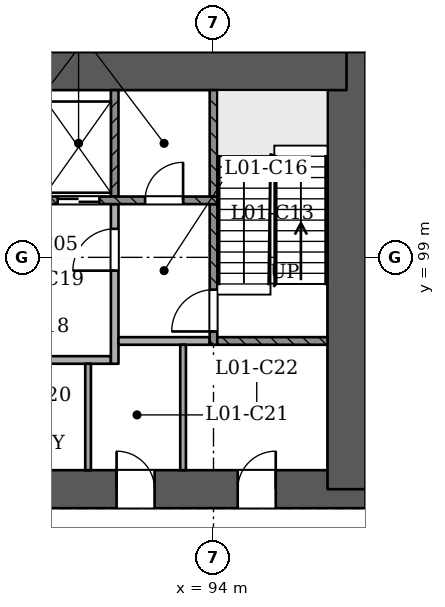
"""IFC4 building model, lengths in metres.
Left out: names, types, materials, properties, quantities, classifications, styles, units other than length and angle.
Written with IfcOpenShell. Run it as: python <this file> out.ifc"""

import sys

from ifc_helpers import new_model, si_unit, direction, frame, frame_2d, origin, place, context, subcontext, project, spatial, rectangle, extrude, element, fill, save


model = new_model("IFC4")
c1 = context("Model", 3, precision=1e-05, world=origin(), true_north=direction((0.0, 1.0)))
c2 = subcontext(c1, "Body", "Model", "MODEL_VIEW")
j1 = project(units=[si_unit("LENGTHUNIT", "METRE"), si_unit("PLANEANGLEUNIT", "RADIAN")], contexts=[c1])
p1 = place(None, origin())
s1 = spatial("IfcSite", under=j1, at=p1, CompositionType="ELEMENT")
p2 = place(p1, origin())
s2 = spatial("IfcBuilding", under=s1, at=p2, CompositionType="ELEMENT")
p3 = place(p2, frame((0.0, 0.0, 9.0)))
s3 = spatial("IfcBuildingStorey", under=s2, at=p3, CompositionType="ELEMENT", Elevation=9.0)
p4 = place(p3, frame((72.5, 92.9, 0.0), z_axis=(0.0, 0.0, 1.0), x_axis=(1.0, 0.0, 0.0)))
e1 = element("IfcWall", 1, at=p4, inside=s3, PredefinedType="SHEAR", context=c2, shape_type="SweptSolid", body=[
    extrude(rectangle(XDim=25.5, YDim=1.0, at=frame_2d((12.75, 0.0))), origin(), (0.0, 0.0, 1.0), 4.5),
])
p5 = place(p4, frame((1.3, 0.0, 0.0)))
e2 = element("IfcOpeningElement", 2, at=p5, cuts=e1, PredefinedType="OPENING", context=c2, shape_type="SweptSolid", body=[
    extrude(rectangle(XDim=1.2, YDim=2.1, at=frame_2d((0.6, 1.05))), frame((0.0, 0.51, 0.0), z_axis=(0.0, -1.0, 0.0), x_axis=(1.0, 0.0, 0.0)), (0.0, 0.0, 1.0), 1.021),
])
p6 = place(p4, frame((3.5, 0.0, 0.0)))
e3 = element("IfcOpeningElement", 3, at=p6, cuts=e1, PredefinedType="OPENING", context=c2, shape_type="SweptSolid", body=[
    extrude(rectangle(XDim=1.2, YDim=2.1, at=frame_2d((0.6, 1.05))), frame((0.0, 0.51, 0.0), z_axis=(0.0, -1.0, 0.0), x_axis=(1.0, 0.0, 0.0)), (0.0, 0.0, 1.0), 1.021),
])
p7 = place(p4, frame((13.5, 0.0, 0.0)))
e4 = element("IfcOpeningElement", 4, at=p7, cuts=e1, PredefinedType="OPENING", context=c2, shape_type="SweptSolid", body=[
    extrude(rectangle(XDim=1.2, YDim=2.1, at=frame_2d((0.6, 1.05))), frame((0.0, 0.51, 0.0), z_axis=(0.0, -1.0, 0.0), x_axis=(1.0, 0.0, 0.0)), (0.0, 0.0, 1.0), 1.021),
])
p8 = place(p4, frame((16.163, 0.0, 0.0)))
e5 = element("IfcOpeningElement", 5, at=p8, cuts=e1, PredefinedType="OPENING", context=c2, shape_type="SweptSolid", body=[
    extrude(rectangle(XDim=1.0, YDim=2.1, at=frame_2d((0.5, 1.05))), frame((0.0, 0.51, 0.0), z_axis=(0.0, -1.0, 0.0), x_axis=(1.0, 0.0, 0.0)), (0.0, 0.0, 1.0), 1.021),
])
p9 = place(p4, frame((18.95, 0.0, 0.0)))
e6 = element("IfcOpeningElement", 6, at=p9, cuts=e1, PredefinedType="OPENING", context=c2, shape_type="SweptSolid", body=[
    extrude(rectangle(XDim=1.0, YDim=2.1, at=frame_2d((0.5, 1.05))), frame((0.0, 0.51, 0.0), z_axis=(0.0, -1.0, 0.0), x_axis=(1.0, 0.0, 0.0)), (0.0, 0.0, 1.0), 1.021),
])
p10 = place(p4, frame((22.137, 0.0, 0.0)))
e7 = element("IfcOpeningElement", 7, at=p10, cuts=e1, PredefinedType="OPENING", context=c2, shape_type="SweptSolid", body=[
    extrude(rectangle(XDim=1.0, YDim=2.1, at=frame_2d((0.5, 1.05))), frame((0.0, 0.51, 0.0), z_axis=(0.0, -1.0, 0.0), x_axis=(1.0, 0.0, 0.0)), (0.0, 0.0, 1.0), 1.021),
])
p11 = place(p3, frame((97.5, 92.9, 0.0), z_axis=(0.0, 0.0, 1.0), x_axis=(0.0, 1.0, 0.0)))
e8 = element("IfcWall", 8, at=p11, inside=s3, PredefinedType="SHEAR", context=c2, shape_type="SweptSolid", body=[
    extrude(rectangle(XDim=11.5, YDim=1.0, at=frame_2d((5.75, 0.0))), origin(), (0.0, 0.0, 1.0), 4.5),
])
p12 = place(p3, frame((97.5, 103.9, 0.0), z_axis=(0.0, 0.0, 1.0), x_axis=(-1.0, 0.0, 0.0)))
e9 = element("IfcWall", 9, at=p12, inside=s3, PredefinedType="SHEAR", context=c2, shape_type="SweptSolid", body=[
    extrude(rectangle(XDim=25.5, YDim=1.0, at=frame_2d((12.75, 0.0))), origin(), (0.0, 0.0, 1.0), 4.5),
])
p13 = place(p3, frame((86.747, 47.526, 0.0), z_axis=(0.0, 0.0, 1.0), x_axis=(0.500000085768, 0.866025354266, 0.0)))
e10 = element("IfcWall", 10, at=p13, inside=s3, PredefinedType="PARTITIONING", context=c2, shape_type="SweptSolid", body=[
    extrude(rectangle(XDim=55.365, YDim=0.15, at=frame_2d((27.682, 0.0))), origin(), (0.0, 0.0, 1.0), 4.05),
])
p14 = place(p13, frame((0.97, 0.0, 0.0)))
e11 = element("IfcOpeningElement", 11, at=p14, cuts=e10, PredefinedType="OPENING", context=c2, shape_type="SweptSolid", body=[
    extrude(rectangle(XDim=1.2, YDim=2.1, at=frame_2d((0.6, 1.05))), frame((0.0, 0.085, 0.0), z_axis=(0.0, -1.0, 0.0), x_axis=(1.0, 0.0, 0.0)), (0.0, 0.0, 1.0), 0.171),
])
p15 = place(p13, frame((9.082, 0.0, 0.0)))
e12 = element("IfcOpeningElement", 12, at=p15, cuts=e10, PredefinedType="OPENING", context=c2, shape_type="SweptSolid", body=[
    extrude(rectangle(XDim=1.2, YDim=2.1, at=frame_2d((0.6, 1.05))), frame((0.0, 0.085, 0.0), z_axis=(0.0, -1.0, 0.0), x_axis=(1.0, 0.0, 0.0)), (0.0, 0.0, 1.0), 0.171),
])
p16 = place(p13, frame((18.082, 0.0, 0.0)))
e13 = element("IfcOpeningElement", 13, at=p16, cuts=e10, PredefinedType="OPENING", context=c2, shape_type="SweptSolid", body=[
    extrude(rectangle(XDim=1.2, YDim=2.1, at=frame_2d((0.6, 1.05))), frame((0.0, 0.085, 0.0), z_axis=(0.0, -1.0, 0.0), x_axis=(1.0, 0.0, 0.0)), (0.0, 0.0, 1.0), 0.171),
])
p17 = place(p13, frame((23.613, 0.0, 0.0)))
e14 = element("IfcOpeningElement", 14, at=p17, cuts=e10, PredefinedType="OPENING", context=c2, shape_type="SweptSolid", body=[
    extrude(rectangle(XDim=1.0, YDim=2.1, at=frame_2d((0.5, 1.05))), frame((0.0, 0.085, 0.0), z_axis=(0.0, -1.0, 0.0), x_axis=(1.0, 0.0, 0.0)), (0.0, 0.0, 1.0), 0.171),
])
p18 = place(p13, frame((26.363, 0.0, 0.0)))
e15 = element("IfcOpeningElement", 15, at=p18, cuts=e10, PredefinedType="OPENING", context=c2, shape_type="SweptSolid", body=[
    extrude(rectangle(XDim=1.0, YDim=2.1, at=frame_2d((0.5, 1.05))), frame((0.0, 0.085, 0.0), z_axis=(0.0, -1.0, 0.0), x_axis=(1.0, 0.0, 0.0)), (0.0, 0.0, 1.0), 0.171),
])
p19 = place(p13, frame((33.032, 0.0, 0.0)))
e16 = element("IfcOpeningElement", 16, at=p19, cuts=e10, PredefinedType="OPENING", context=c2, shape_type="SweptSolid", body=[
    extrude(rectangle(XDim=1.2, YDim=2.1, at=frame_2d((0.6, 1.05))), frame((0.0, 0.085, 0.0), z_axis=(0.0, -1.0, 0.0), x_axis=(1.0, 0.0, 0.0)), (0.0, 0.0, 1.0), 0.171),
])
p20 = place(p13, frame((47.337, 0.0, 0.0)))
e17 = element("IfcOpeningElement", 17, at=p20, cuts=e10, PredefinedType="OPENING", context=c2, shape_type="SweptSolid", body=[
    extrude(rectangle(XDim=1.2, YDim=2.1, at=frame_2d((0.6, 1.05))), frame((0.0, 0.085, 0.0), z_axis=(0.0, -1.0, 0.0), x_axis=(1.0, 0.0, 0.0)), (0.0, 0.0, 1.0), 0.171),
])
p21 = place(p3, frame((121.762, 95.574, 0.0), z_axis=(0.0, 0.0, 1.0), x_axis=(-0.499997306052, -0.866026959131, 0.0)))
e18 = element("IfcWall", 18, at=p21, inside=s3, PredefinedType="SOLIDWALL", context=c2, shape_type="SweptSolid", body=[
    extrude(rectangle(XDim=62.87, YDim=0.4, at=frame_2d((31.435, 0.0))), origin(), (0.0, 0.0, 1.0), 4.05),
])
p22 = place(p21, frame((59.452, 0.0, 0.9)))
e19 = element("IfcOpeningElement", 19, at=p22, cuts=e18, PredefinedType="OPENING", context=c2, shape_type="SweptSolid", body=[
    extrude(rectangle(XDim=2.4, YDim=1.5, at=frame_2d((1.2, 0.75))), frame((0.0, 0.21, 0.0), z_axis=(0.0, -1.0, 0.0), x_axis=(1.0, 0.0, 0.0)), (0.0, 0.0, 1.0), 0.421),
])
p23 = place(p21, frame((54.986, 0.0, 0.9)))
e20 = element("IfcOpeningElement", 20, at=p23, cuts=e18, PredefinedType="OPENING", context=c2, shape_type="SweptSolid", body=[
    extrude(rectangle(XDim=2.4, YDim=1.5, at=frame_2d((1.2, 0.75))), frame((0.0, 0.21, 0.0), z_axis=(0.0, -1.0, 0.0), x_axis=(1.0, 0.0, 0.0)), (0.0, 0.0, 1.0), 0.421),
])
p24 = place(p21, frame((50.486, 0.0, 0.9)))
e21 = element("IfcOpeningElement", 21, at=p24, cuts=e18, PredefinedType="OPENING", context=c2, shape_type="SweptSolid", body=[
    extrude(rectangle(XDim=2.4, YDim=1.5, at=frame_2d((1.2, 0.75))), frame((0.0, 0.21, 0.0), z_axis=(0.0, -1.0, 0.0), x_axis=(1.0, 0.0, 0.0)), (0.0, 0.0, 1.0), 0.421),
])
p25 = place(p21, frame((45.986, 0.0, 0.9)))
e22 = element("IfcOpeningElement", 22, at=p25, cuts=e18, PredefinedType="OPENING", context=c2, shape_type="SweptSolid", body=[
    extrude(rectangle(XDim=2.4, YDim=1.5, at=frame_2d((1.2, 0.75))), frame((0.0, 0.21, 0.0), z_axis=(0.0, -1.0, 0.0), x_axis=(1.0, 0.0, 0.0)), (0.0, 0.0, 1.0), 0.421),
])
p26 = place(p21, frame((41.486, 0.0, 0.9)))
e23 = element("IfcOpeningElement", 23, at=p26, cuts=e18, PredefinedType="OPENING", context=c2, shape_type="SweptSolid", body=[
    extrude(rectangle(XDim=2.4, YDim=1.5, at=frame_2d((1.2, 0.75))), frame((0.0, 0.21, 0.0), z_axis=(0.0, -1.0, 0.0), x_axis=(1.0, 0.0, 0.0)), (0.0, 0.0, 1.0), 0.421),
])
p27 = place(p21, frame((36.986, 0.0, 0.9)))
e24 = element("IfcOpeningElement", 24, at=p27, cuts=e18, PredefinedType="OPENING", context=c2, shape_type="SweptSolid", body=[
    extrude(rectangle(XDim=2.4, YDim=1.5, at=frame_2d((1.2, 0.75))), frame((0.0, 0.21, 0.0), z_axis=(0.0, -1.0, 0.0), x_axis=(1.0, 0.0, 0.0)), (0.0, 0.0, 1.0), 0.421),
])
p28 = place(p21, frame((23.486, 0.0, 0.9)))
e25 = element("IfcOpeningElement", 25, at=p28, cuts=e18, PredefinedType="OPENING", context=c2, shape_type="SweptSolid", body=[
    extrude(rectangle(XDim=2.4, YDim=1.5, at=frame_2d((1.2, 0.75))), frame((0.0, 0.21, 0.0), z_axis=(0.0, -1.0, 0.0), x_axis=(1.0, 0.0, 0.0)), (0.0, 0.0, 1.0), 0.421),
])
p29 = place(p21, frame((18.986, 0.0, 0.9)))
e26 = element("IfcOpeningElement", 26, at=p29, cuts=e18, PredefinedType="OPENING", context=c2, shape_type="SweptSolid", body=[
    extrude(rectangle(XDim=2.4, YDim=1.5, at=frame_2d((1.2, 0.75))), frame((0.0, 0.21, 0.0), z_axis=(0.0, -1.0, 0.0), x_axis=(1.0, 0.0, 0.0)), (0.0, 0.0, 1.0), 0.421),
])
p30 = place(p21, frame((14.486, 0.0, 0.9)))
e27 = element("IfcOpeningElement", 27, at=p30, cuts=e18, PredefinedType="OPENING", context=c2, shape_type="SweptSolid", body=[
    extrude(rectangle(XDim=2.4, YDim=1.5, at=frame_2d((1.2, 0.75))), frame((0.0, 0.21, 0.0), z_axis=(0.0, -1.0, 0.0), x_axis=(1.0, 0.0, 0.0)), (0.0, 0.0, 1.0), 0.421),
])
p31 = place(p21, frame((5.486, 0.0, 0.9)))
e28 = element("IfcOpeningElement", 28, at=p31, cuts=e18, PredefinedType="OPENING", context=c2, shape_type="SweptSolid", body=[
    extrude(rectangle(XDim=2.4, YDim=1.5, at=frame_2d((1.2, 0.75))), frame((0.0, 0.21, 0.0), z_axis=(0.0, -1.0, 0.0), x_axis=(1.0, 0.0, 0.0)), (0.0, 0.0, 1.0), 0.421),
])
p32 = place(p21, frame((1.018, 0.0, 0.9)))
e29 = element("IfcOpeningElement", 29, at=p32, cuts=e18, PredefinedType="OPENING", context=c2, shape_type="SweptSolid", body=[
    extrude(rectangle(XDim=2.4, YDim=1.5, at=frame_2d((1.2, 0.75))), frame((0.0, 0.21, 0.0), z_axis=(0.0, -1.0, 0.0), x_axis=(1.0, 0.0, 0.0)), (0.0, 0.0, 1.0), 0.421),
])
p33 = place(p3, frame((90.7, 93.4, 0.0), z_axis=(0.0, 0.0, 1.0), x_axis=(0.0, 1.0, 0.0)))
e30 = element("IfcWall", 30, at=p33, inside=s3, PredefinedType="PARTITIONING", context=c2, shape_type="SweptSolid", body=[
    extrude(rectangle(XDim=2.8, YDim=0.15, at=frame_2d((1.4, 0.0))), origin(), (0.0, 0.0, 1.0), 4.05),
])
p34 = place(p3, frame((93.2, 93.4, 0.0), z_axis=(0.0, 0.0, 1.0), x_axis=(0.0, 1.0, 0.0)))
e31 = element("IfcWall", 31, at=p34, inside=s3, PredefinedType="PARTITIONING", context=c2, shape_type="SweptSolid", body=[
    extrude(rectangle(XDim=3.3, YDim=0.15, at=frame_2d((1.65, 0.0))), origin(), (0.0, 0.0, 1.0), 4.05),
])
p35 = place(p3, frame((87.7, 96.3, 0.0), z_axis=(0.0, 0.0, 1.0), x_axis=(1.0, 0.0, 0.0)))
e32 = element("IfcWall", 32, at=p35, inside=s3, PredefinedType="PARTITIONING", context=c2, shape_type="SweptSolid", body=[
    extrude(rectangle(XDim=3.6, YDim=0.2, at=frame_2d((1.8, 0.0))), origin(), (0.0, 0.0, 1.0), 4.05),
])
p36 = place(p3, frame((91.4, 96.2, 0.0), z_axis=(0.0, 0.0, 1.0), x_axis=(0.0, 1.0, 0.0)))
e33 = element("IfcWall", 33, at=p36, inside=s3, PredefinedType="PARTITIONING", context=c2, shape_type="SweptSolid", body=[
    extrude(rectangle(XDim=4.2, YDim=0.2, at=frame_2d((2.1, 0.0))), origin(), (0.0, 0.0, 1.0), 4.05),
])
p37 = place(p36, frame((2.45, 0.0, 0.0)))
e34 = element("IfcOpeningElement", 34, at=p37, cuts=e33, PredefinedType="OPENING", context=c2, shape_type="SweptSolid", body=[
    extrude(rectangle(XDim=1.1, YDim=2.1, at=frame_2d((0.55, 1.05))), frame((0.0, 0.11, 0.0), z_axis=(0.0, -1.0, 0.0), x_axis=(1.0, 0.0, 0.0)), (0.0, 0.0, 1.0), 0.221),
])
p38 = place(p3, frame((91.5, 96.8, 0.0), z_axis=(0.0, 0.0, 1.0), x_axis=(1.0, 0.0, 0.0)))
e35 = element("IfcWall", 35, at=p38, inside=s3, PredefinedType="PARTITIONING", context=c2, shape_type="SweptSolid", body=[
    extrude(rectangle(XDim=2.4, YDim=0.2, at=frame_2d((1.2, 0.0))), origin(), (0.0, 0.0, 1.0), 4.05),
])
p39 = place(p3, frame((94.0, 96.7, 0.0), z_axis=(0.0, 0.0, 1.0), x_axis=(0.0, 1.0, 0.0)))
e36 = element("IfcWall", 36, at=p39, inside=s3, PredefinedType="SOLIDWALL", context=c2, shape_type="SweptSolid", body=[
    extrude(rectangle(XDim=3.7, YDim=0.2, at=frame_2d((1.85, 0.0))), origin(), (0.0, 0.0, 1.0), 4.05),
])
p40 = place(p39, frame((0.35, 0.0, 0.0)))
e37 = element("IfcOpeningElement", 37, at=p40, cuts=e36, PredefinedType="OPENING", context=c2, shape_type="SweptSolid", body=[
    extrude(rectangle(XDim=1.1, YDim=2.1, at=frame_2d((0.55, 1.05))), frame((0.0, 0.11, 0.0), z_axis=(0.0, -1.0, 0.0), x_axis=(1.0, 0.0, 0.0)), (0.0, 0.0, 1.0), 0.221),
])
p41 = place(p3, frame((94.1, 96.8, 0.0), z_axis=(0.0, 0.0, 1.0), x_axis=(1.0, 0.0, 0.0)))
e38 = element("IfcWall", 38, at=p41, inside=s3, PredefinedType="SOLIDWALL", context=c2, shape_type="SweptSolid", body=[
    extrude(rectangle(XDim=2.9, YDim=0.2, at=frame_2d((1.45, 0.0))), origin(), (0.0, 0.0, 1.0), 4.05),
])
p42 = place(p3, frame((75.9, 100.5, 0.0), z_axis=(0.0, 0.0, 1.0), x_axis=(1.0, 0.0, 0.0)))
e39 = element("IfcWall", 39, at=p42, inside=s3, PredefinedType="SOLIDWALL", context=c2, shape_type="SweptSolid", body=[
    extrude(rectangle(XDim=18.2, YDim=0.2, at=frame_2d((9.1, 0.0))), origin(), (0.0, 0.0, 1.0), 4.05),
])
p43 = place(p42, frame((2.6, 0.0, 0.0)))
e40 = element("IfcOpeningElement", 40, at=p43, cuts=e39, PredefinedType="OPENING", context=c2, shape_type="SweptSolid", body=[
    extrude(rectangle(XDim=1.1, YDim=2.1, at=frame_2d((0.55, 1.05))), frame((0.0, 0.11, 0.0), z_axis=(0.0, -1.0, 0.0), x_axis=(1.0, 0.0, 0.0)), (0.0, 0.0, 1.0), 0.221),
])
p44 = place(p42, frame((4.5, 0.0, 0.0)))
e41 = element("IfcOpeningElement", 41, at=p44, cuts=e39, PredefinedType="OPENING", context=c2, shape_type="SweptSolid", body=[
    extrude(rectangle(XDim=1.1, YDim=2.1, at=frame_2d((0.55, 1.05))), frame((0.0, 0.11, 0.0), z_axis=(0.0, -1.0, 0.0), x_axis=(1.0, 0.0, 0.0)), (0.0, 0.0, 1.0), 0.221),
])
p45 = place(p42, frame((6.4, 0.0, 0.0)))
e42 = element("IfcOpeningElement", 42, at=p45, cuts=e39, PredefinedType="OPENING", context=c2, shape_type="SweptSolid", body=[
    extrude(rectangle(XDim=1.1, YDim=2.1, at=frame_2d((0.55, 1.05))), frame((0.0, 0.11, 0.0), z_axis=(0.0, -1.0, 0.0), x_axis=(1.0, 0.0, 0.0)), (0.0, 0.0, 1.0), 0.221),
])
p46 = place(p42, frame((8.3, 0.0, 0.0)))
e43 = element("IfcOpeningElement", 43, at=p46, cuts=e39, PredefinedType="OPENING", context=c2, shape_type="SweptSolid", body=[
    extrude(rectangle(XDim=1.1, YDim=2.1, at=frame_2d((0.55, 1.05))), frame((0.0, 0.11, 0.0), z_axis=(0.0, -1.0, 0.0), x_axis=(1.0, 0.0, 0.0)), (0.0, 0.0, 1.0), 0.221),
])
p47 = place(p42, frame((10.2, 0.0, 0.0)))
e44 = element("IfcOpeningElement", 44, at=p47, cuts=e39, PredefinedType="OPENING", context=c2, shape_type="SweptSolid", body=[
    extrude(rectangle(XDim=1.1, YDim=2.1, at=frame_2d((0.55, 1.05))), frame((0.0, 0.11, 0.0), z_axis=(0.0, -1.0, 0.0), x_axis=(1.0, 0.0, 0.0)), (0.0, 0.0, 1.0), 0.221),
])
p48 = place(p42, frame((12.1, 0.0, 0.0)))
e45 = element("IfcOpeningElement", 45, at=p48, cuts=e39, PredefinedType="OPENING", context=c2, shape_type="SweptSolid", body=[
    extrude(rectangle(XDim=1.1, YDim=2.1, at=frame_2d((0.55, 1.05))), frame((0.0, 0.11, 0.0), z_axis=(0.0, -1.0, 0.0), x_axis=(1.0, 0.0, 0.0)), (0.0, 0.0, 1.0), 0.221),
])
p49 = place(p42, frame((14.0, 0.0, 0.0)))
e46 = element("IfcOpeningElement", 46, at=p49, cuts=e39, PredefinedType="OPENING", context=c2, shape_type="SweptSolid", body=[
    extrude(rectangle(XDim=1.1, YDim=2.1, at=frame_2d((0.55, 1.05))), frame((0.0, 0.11, 0.0), z_axis=(0.0, -1.0, 0.0), x_axis=(1.0, 0.0, 0.0)), (0.0, 0.0, 1.0), 0.221),
])
p50 = place(p42, frame((0.65, 0.0, 0.0)))
e47 = element("IfcOpeningElement", 47, at=p50, cuts=e39, PredefinedType="OPENING", context=c2, shape_type="SweptSolid", body=[
    extrude(rectangle(XDim=1.0, YDim=2.1, at=frame_2d((0.5, 1.05))), frame((0.0, 0.11, 0.0), z_axis=(0.0, -1.0, 0.0), x_axis=(1.0, 0.0, 0.0)), (0.0, 0.0, 1.0), 0.221),
])
p51 = place(p42, frame((16.3, 0.0, 0.0)))
e48 = element("IfcOpeningElement", 48, at=p51, cuts=e39, PredefinedType="OPENING", context=c2, shape_type="SweptSolid", body=[
    extrude(rectangle(XDim=1.0, YDim=2.1, at=frame_2d((0.5, 1.05))), frame((0.0, 0.11, 0.0), z_axis=(0.0, -1.0, 0.0), x_axis=(1.0, 0.0, 0.0)), (0.0, 0.0, 1.0), 0.221),
])
for number, where, z_axis, x_axis in (
    (49, (91.4, 100.6, 0.0), (0.0, 0.0, 1.0), (0.0, 1.0, 0.0)),
    (50, (94.0, 100.6, 0.0), (0.0, 0.0, 1.0), (0.0, 1.0, 0.0)),
):
    element("IfcWall", number, at=place(p3, frame(where, z_axis=z_axis, x_axis=x_axis)), inside=s3, PredefinedType="SOLIDWALL", context=c2, shape_type="SweptSolid", body=[
        extrude(rectangle(XDim=2.8, YDim=0.2, at=frame_2d((1.4, 0.0))), origin(), (0.0, 0.0, 1.0), 4.05),
    ])
p52 = place(p49, origin())
e51 = element("IfcDoor", 51, at=p52, inside=s3, OperationType="SLIDING_TO_LEFT", PredefinedType="NOTDEFINED", context=c2, shape_type="SweptSolid", body=[
    extrude(rectangle(XDim=1.1, YDim=2.1, at=frame_2d((0.55, 1.05))), frame((0.0, 0.025, 0.0), z_axis=(0.0, -1.0, 0.0), x_axis=(1.0, 0.0, 0.0)), (0.0, 0.0, 1.0), 0.05),
])
fill(e46, e51)
p53 = place(p40, origin())
e52 = element("IfcDoor", 52, at=p53, inside=s3, OperationType="SINGLE_SWING_LEFT", PredefinedType="NOTDEFINED", context=c2, shape_type="SweptSolid", body=[
    extrude(rectangle(XDim=1.1, YDim=2.1, at=frame_2d((0.55, 1.05))), frame((0.0, 0.025, 0.0), z_axis=(0.0, -1.0, 0.0), x_axis=(1.0, 0.0, 0.0)), (0.0, 0.0, 1.0), 0.05),
])
fill(e37, e52)
p54 = place(p37, origin())
e53 = element("IfcDoor", 53, at=p54, inside=s3, OperationType="SINGLE_SWING_LEFT", PredefinedType="NOTDEFINED", context=c2, shape_type="SweptSolid", body=[
    extrude(rectangle(XDim=1.1, YDim=2.1, at=frame_2d((0.55, 1.05))), frame((0.0, 0.025, 0.0), z_axis=(0.0, -1.0, 0.0), x_axis=(1.0, 0.0, 0.0)), (0.0, 0.0, 1.0), 0.05),
])
fill(e34, e53)
p55 = place(p51, origin())
e54 = element("IfcDoor", 54, at=p55, inside=s3, OperationType="SINGLE_SWING_RIGHT", PredefinedType="NOTDEFINED", context=c2, shape_type="SweptSolid", body=[
    extrude(rectangle(XDim=1.0, YDim=2.1, at=frame_2d((0.5, 1.05))), frame((0.0, 0.025, 0.0), z_axis=(0.0, -1.0, 0.0), x_axis=(1.0, 0.0, 0.0)), (0.0, 0.0, 1.0), 0.05),
])
fill(e48, e54)
p56 = place(p9, origin())
e55 = element("IfcDoor", 55, at=p56, inside=s3, OperationType="SINGLE_SWING_LEFT", PredefinedType="NOTDEFINED", context=c2, shape_type="SweptSolid", body=[
    extrude(rectangle(XDim=1.0, YDim=2.1, at=frame_2d((0.5, 1.05))), frame((0.0, 0.025, 0.0), z_axis=(0.0, -1.0, 0.0), x_axis=(1.0, 0.0, 0.0)), (0.0, 0.0, 1.0), 0.05),
])
fill(e6, e55)
p57 = place(p10, origin())
e56 = element("IfcDoor", 56, at=p57, inside=s3, OperationType="SINGLE_SWING_RIGHT", PredefinedType="NOTDEFINED", context=c2, shape_type="SweptSolid", body=[
    extrude(rectangle(XDim=1.0, YDim=2.1, at=frame_2d((0.5, 1.05))), frame((0.0, 0.025, 0.0), z_axis=(0.0, -1.0, 0.0), x_axis=(1.0, 0.0, 0.0)), (0.0, 0.0, 1.0), 0.05),
])
fill(e7, e56)
save(model, sys.argv[1])
